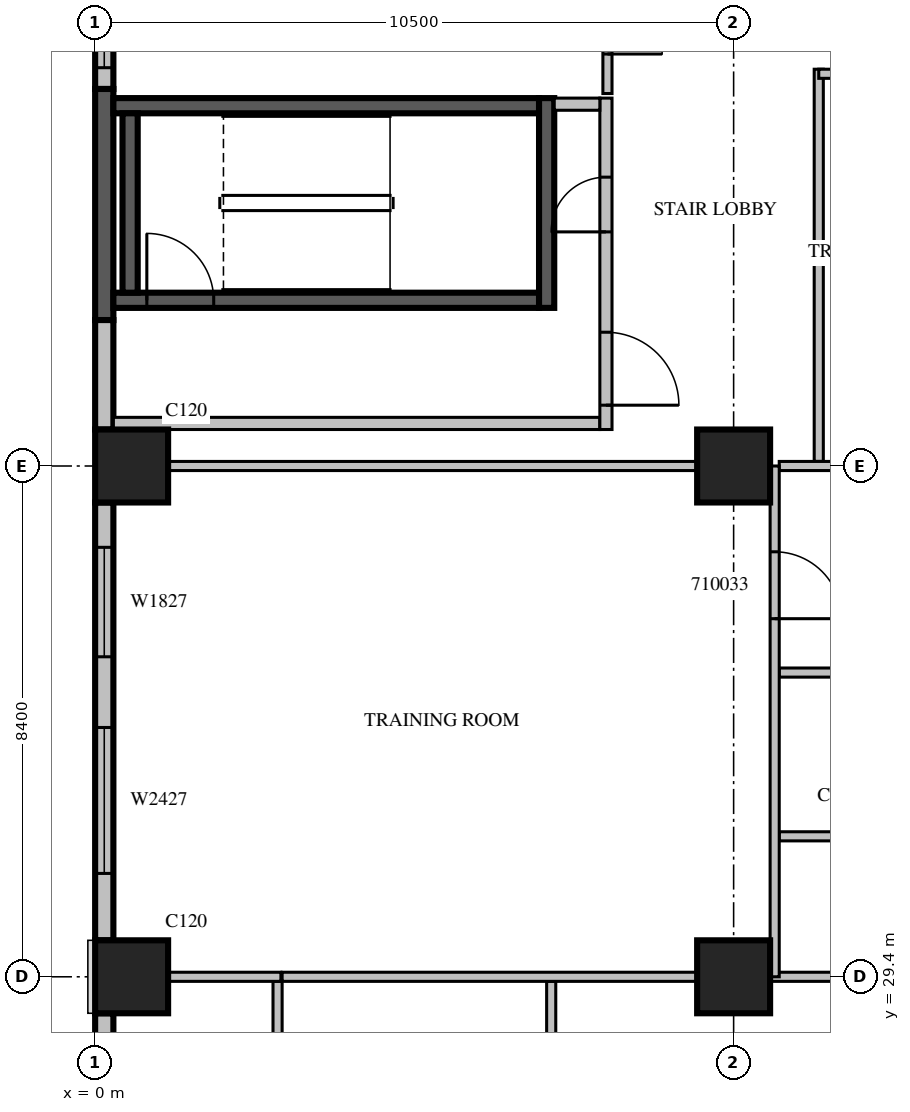
"""IFC4 building model, lengths in metres.
Left out: names, types, materials, properties, quantities, classifications, styles, units other than length and angle.
Written with IfcOpenShell. Run it as: python <this file> out.ifc"""

import sys

from ifc_helpers import new_model, si_unit, direction, frame, frame_2d, origin, origin_2d, place, context, subcontext, project, spatial, rectangle, extrude, source, transform, mapped, element, fill, save


model = new_model("IFC4")
c1 = context("Model", 3, precision=1e-05, world=origin(), true_north=direction((0.0, 1.0)))
c2 = subcontext(c1, "Body", "Model", "MODEL_VIEW")
j1 = project(units=[si_unit("LENGTHUNIT", "METRE"), si_unit("PLANEANGLEUNIT", "RADIAN")], contexts=[c1])
p1 = place(None, origin())
s1 = spatial("IfcSite", under=j1, at=p1, CompositionType="ELEMENT")
p2 = place(p1, origin())
s2 = spatial("IfcBuilding", under=s1, at=p2, CompositionType="ELEMENT")
p3 = place(p2, frame((0.0, 0.0, 53.1)))
s3 = spatial("IfcBuildingStorey", under=s2, at=p3, CompositionType="ELEMENT", Elevation=53.1)
m1 = source(origin(), c2, "Body", "SweptSolid", [
    extrude(rectangle(XDim=1.2, YDim=1.2, at=origin_2d()), origin(), (0.0, 0.0, 1.0), 4.2),
])
for number, where, z_axis, x_axis in (
    (1, (0.6, 29.4, 0.0), (0.0, 0.0, 1.0), (1.0, 0.0, 0.0)),
    (2, (10.5, 29.4, 0.0), (0.0, 0.0, 1.0), (1.0, 0.0, 0.0)),
    (3, (0.6, 37.8, 0.0), (0.0, 0.0, 1.0), (1.0, 0.0, 0.0)),
    (4, (10.5, 37.8, 0.0), (0.0, 0.0, 1.0), (1.0, 0.0, 0.0)),
):
    element("IfcColumn", number, at=place(p3, frame(where, z_axis=z_axis, x_axis=x_axis)), inside=s3, PredefinedType="COLUMN", context=c2, shape_type="MappedRepresentation", body=[
        mapped(m1, transform((0.0, 0.0, 0.0), scale=1.0)),
    ])
m2 = source(origin(), c2, "Body", "SweptSolid", [
    extrude(rectangle(XDim=1.6, YDim=0.3, at=frame_2d((0.8, 0.0))), origin(), (0.0, 0.0, 1.0), 3.8),
])
p4 = place(p3, frame((0.15, 45.6, 0.0), z_axis=(0.0, 0.0, 1.0), x_axis=(0.0, -1.0, 0.0)))
e5 = element("IfcWall", 5, at=p4, inside=s3, PredefinedType="STANDARD", context=c2, shape_type="MappedRepresentation", body=[
    mapped(m2, transform((0.0, 0.0, 0.0), scale=1.0)),
])
m3 = source(origin(), c2, "Body", "SweptSolid", [
    extrude(rectangle(XDim=0.9, YDim=2.7, at=frame_2d((0.45, 1.35))), frame((0.0, 0.16, 0.0), z_axis=(0.0, -1.0, 0.0), x_axis=(1.0, 0.0, 0.0)), (0.0, 0.0, 1.0), 0.32),
])
p5 = place(p4, frame((0.35, 0.0, 0.6)))
e6 = element("IfcOpeningElement", 6, at=p5, cuts=e5, PredefinedType="OPENING", context=c2, shape_type="MappedRepresentation", body=[
    mapped(m3, transform((0.0, 0.0, 0.0), scale=1.0)),
])
m4 = source(origin(), c2, "Body", "SweptSolid", [
    extrude(rectangle(XDim=3.8, YDim=0.3, at=frame_2d((1.9, 0.0))), origin(), (0.0, 0.0, 1.0), 3.8),
])
p6 = place(p3, frame((0.15, 44.0, 0.0), z_axis=(0.0, 0.0, 1.0), x_axis=(0.0, -1.0, 0.0)))
e7 = element("IfcWall", 7, at=p6, inside=s3, PredefinedType="SOLIDWALL", context=c2, shape_type="MappedRepresentation", body=[
    mapped(m4, transform((0.0, 0.0, 0.0), scale=1.0)),
])
m5 = source(origin(), c2, "Body", "SweptSolid", [
    extrude(rectangle(XDim=1.8, YDim=0.3, at=frame_2d((0.9, 0.0))), origin(), (0.0, 0.0, 1.0), 3.8),
])
p7 = place(p3, frame((0.15, 40.2, 0.0), z_axis=(0.0, 0.0, 1.0), x_axis=(0.0, -1.0, 0.0)))
e8 = element("IfcWall", 8, at=p7, inside=s3, PredefinedType="STANDARD", context=c2, shape_type="MappedRepresentation", body=[
    mapped(m5, transform((0.0, 0.0, 0.0), scale=1.0)),
])
m6 = source(origin(), c2, "Body", "SweptSolid", [
    extrude(rectangle(XDim=7.2, YDim=0.3, at=frame_2d((3.6, 0.0))), origin(), (0.0, 0.0, 1.0), 3.8),
])
p8 = place(p3, frame((0.15, 37.2, 0.0), z_axis=(0.0, 0.0, 1.0), x_axis=(0.0, -1.0, 0.0)))
e9 = element("IfcWall", 9, at=p8, inside=s3, PredefinedType="STANDARD", context=c2, shape_type="MappedRepresentation", body=[
    mapped(m6, transform((0.0, 0.0, 0.0), scale=1.0)),
])
m7 = source(origin(), c2, "Body", "SweptSolid", [
    extrude(rectangle(XDim=1.8, YDim=2.7, at=frame_2d((0.9, 1.35))), frame((0.0, 0.16, 0.0), z_axis=(0.0, -1.0, 0.0), x_axis=(1.0, 0.0, 0.0)), (0.0, 0.0, 1.0), 0.32),
])
p9 = place(p8, frame((0.738, 0.0, 0.6)))
e10 = element("IfcOpeningElement", 10, at=p9, cuts=e9, PredefinedType="OPENING", context=c2, shape_type="MappedRepresentation", body=[
    mapped(m7, transform((0.0, 0.0, 0.0), scale=1.0)),
])
m8 = source(origin(), c2, "Body", "SweptSolid", [
    extrude(rectangle(XDim=2.4, YDim=2.7, at=frame_2d((1.2, 1.35))), frame((0.0, 0.16, 0.0), z_axis=(0.0, -1.0, 0.0), x_axis=(1.0, 0.0, 0.0)), (0.0, 0.0, 1.0), 0.32),
])
p10 = place(p8, frame((3.7, 0.0, 0.6)))
e11 = element("IfcOpeningElement", 11, at=p10, cuts=e9, PredefinedType="OPENING", context=c2, shape_type="MappedRepresentation", body=[
    mapped(m8, transform((0.0, 0.0, 0.0), scale=1.0)),
])
m9 = source(origin(), c2, "Body", "SweptSolid", [
    extrude(rectangle(XDim=7.2, YDim=0.3, at=frame_2d((3.6, 0.0))), origin(), (0.0, 0.0, 1.0), 3.3),
])
p11 = place(p3, frame((0.15, 28.8, 0.0), z_axis=(0.0, 0.0, 1.0), x_axis=(0.0, -1.0, 0.0)))
e12 = element("IfcWall", 12, at=p11, inside=s3, PredefinedType="STANDARD", context=c2, shape_type="MappedRepresentation", body=[
    mapped(m9, transform((0.0, 0.0, 0.0), scale=1.0)),
])
m10 = source(origin(), c2, "Body", "SweptSolid", [
    extrude(rectangle(XDim=3.0, YDim=2.7, at=frame_2d((1.5, 1.35))), frame((0.0, 0.16, 0.0), z_axis=(0.0, -1.0, 0.0), x_axis=(1.0, 0.0, 0.0)), (0.0, 0.0, 1.0), 0.32),
])
p12 = place(p11, frame((1.68, 0.0, 0.6)))
e13 = element("IfcOpeningElement", 13, at=p12, cuts=e12, PredefinedType="OPENING", context=c2, shape_type="MappedRepresentation", body=[
    mapped(m10, transform((0.0, 0.0, 0.0), scale=1.0)),
])
m11 = source(origin(), c2, "Body", "SweptSolid", [
    extrude(rectangle(XDim=7.0, YDim=0.25, at=frame_2d((3.5, 0.0))), origin(), (0.0, 0.0, 1.0), 3.8),
])
p13 = place(p3, frame((0.3, 40.525, 0.0), z_axis=(0.0, 0.0, 1.0), x_axis=(1.0, 0.0, 0.0)))
e14 = element("IfcWall", 14, at=p13, inside=s3, PredefinedType="SOLIDWALL", context=c2, shape_type="MappedRepresentation", body=[
    mapped(m11, transform((0.0, 0.0, 0.0), scale=1.0)),
])
m12 = source(origin(), c2, "Body", "SweptSolid", [
    extrude(rectangle(XDim=1.1, YDim=2.1, at=frame_2d((0.55, 1.05))), frame((0.0, 0.135, 0.0), z_axis=(0.0, -1.0, 0.0), x_axis=(1.0, 0.0, 0.0)), (0.0, 0.0, 1.0), 0.27),
])
p14 = place(p13, frame((0.55, 0.0, 0.0)))
e15 = element("IfcOpeningElement", 15, at=p14, cuts=e14, PredefinedType="OPENING", context=c2, shape_type="MappedRepresentation", body=[
    mapped(m12, transform((0.0, 0.0, 0.0), scale=1.0)),
])
p15 = place(p3, frame((0.3, 43.725, 0.0), z_axis=(0.0, 0.0, 1.0), x_axis=(1.0, 0.0, 0.0)))
e16 = element("IfcWall", 16, at=p15, inside=s3, PredefinedType="SOLIDWALL", context=c2, shape_type="MappedRepresentation", body=[
    mapped(m11, transform((0.0, 0.0, 0.0), scale=1.0)),
])
m13 = source(origin(), c2, "Body", "SweptSolid", [
    extrude(rectangle(XDim=3.45, YDim=0.25, at=frame_2d((1.725, 0.0))), origin(), (0.0, 0.0, 1.0), 3.8),
])
p16 = place(p3, frame((7.425, 40.4, 0.0), z_axis=(0.0, 0.0, 1.0), x_axis=(0.0, 1.0, 0.0)))
e17 = element("IfcWall", 17, at=p16, inside=s3, PredefinedType="SOLIDWALL", context=c2, shape_type="MappedRepresentation", body=[
    mapped(m13, transform((0.0, 0.0, 0.0), scale=1.0)),
])
m14 = source(origin(), c2, "Body", "SweptSolid", [
    extrude(rectangle(XDim=2.95, YDim=0.25, at=frame_2d((1.475, 0.0))), origin(), (0.0, 0.0, 1.0), 3.8),
])
p17 = place(p3, frame((0.575, 40.65, 0.0), z_axis=(0.0, 0.0, 1.0), x_axis=(0.0, 1.0, 0.0)))
e18 = element("IfcWall", 18, at=p17, inside=s3, PredefinedType="SOLIDWALL", context=c2, shape_type="MappedRepresentation", body=[
    mapped(m14, transform((0.0, 0.0, 0.0), scale=1.0)),
])
m15 = source(origin(), c2, "Body", "SweptSolid", [
    extrude(rectangle(XDim=8.0, YDim=0.2, at=frame_2d((4.0, 0.0))), origin(), (0.0, 0.0, 1.0), 3.8),
])
p18 = place(p3, frame((0.3, 38.5, 0.0), z_axis=(0.0, 0.0, 1.0), x_axis=(1.0, 0.0, 0.0)))
e19 = element("IfcWall", 19, at=p18, inside=s3, PredefinedType="PARTITIONING", context=c2, shape_type="MappedRepresentation", body=[
    mapped(m15, transform((0.0, 0.0, 0.0), scale=1.0)),
])
m16 = source(origin(), c2, "Body", "SweptSolid", [
    extrude(rectangle(XDim=5.45, YDim=0.2, at=frame_2d((2.725, 0.0))), origin(), (0.0, 0.0, 1.0), 3.8),
])
p19 = place(p3, frame((8.4, 38.4, 0.0), z_axis=(0.0, 0.0, 1.0), x_axis=(0.0, 1.0, 0.0)))
e20 = element("IfcWall", 20, at=p19, inside=s3, PredefinedType="PARTITIONING", context=c2, shape_type="MappedRepresentation", body=[
    mapped(m16, transform((0.0, 0.0, 0.0), scale=1.0)),
])
m17 = source(origin(), c2, "Body", "SweptSolid", [
    extrude(rectangle(XDim=1.2, YDim=2.1, at=frame_2d((0.6, 1.05))), frame((0.0, 0.11, 0.0), z_axis=(0.0, -1.0, 0.0), x_axis=(1.0, 0.0, 0.0)), (0.0, 0.0, 1.0), 0.22),
])
p20 = place(p19, frame((0.4, 0.0, 0.0)))
e21 = element("IfcOpeningElement", 21, at=p20, cuts=e20, PredefinedType="OPENING", context=c2, shape_type="MappedRepresentation", body=[
    mapped(m17, transform((0.0, 0.0, 0.0), scale=1.0)),
])
m18 = source(origin(), c2, "Body", "SweptSolid", [
    extrude(rectangle(XDim=0.9, YDim=2.1, at=frame_2d((0.45, 1.05))), frame((0.0, 0.11, 0.0), z_axis=(0.0, -1.0, 0.0), x_axis=(1.0, 0.0, 0.0)), (0.0, 0.0, 1.0), 0.22),
])
p21 = place(p19, frame((3.25, 0.0, 0.0)))
e22 = element("IfcOpeningElement", 22, at=p21, cuts=e20, PredefinedType="OPENING", context=c2, shape_type="MappedRepresentation", body=[
    mapped(m18, transform((0.0, 0.0, 0.0), scale=1.0)),
])
m19 = source(origin(), c2, "Body", "SweptSolid", [
    extrude(rectangle(XDim=0.75, YDim=0.2, at=frame_2d((0.375, 0.0))), origin(), (0.0, 0.0, 1.0), 3.8),
])
p22 = place(p3, frame((7.55, 43.75, 0.0), z_axis=(0.0, 0.0, 1.0), x_axis=(1.0, 0.0, 0.0)))
e23 = element("IfcWall", 23, at=p22, inside=s3, PredefinedType="PARTITIONING", context=c2, shape_type="MappedRepresentation", body=[
    mapped(m19, transform((0.0, 0.0, 0.0), scale=1.0)),
])
m20 = source(origin(), c2, "Body", "SweptSolid", [
    extrude(rectangle(XDim=5.15, YDim=0.15, at=frame_2d((2.575, 0.0))), origin(), (0.0, 0.0, 1.0), 3.3),
])
p23 = place(p3, frame((7.5, 24.175, 0.0), z_axis=(0.0, 0.0, 1.0), x_axis=(0.0, 1.0, 0.0)))
e24 = element("IfcWall", 24, at=p23, inside=s3, PredefinedType="PARTITIONING", context=c2, shape_type="MappedRepresentation", body=[
    mapped(m20, transform((0.0, 0.0, 0.0), scale=1.0)),
])
m21 = source(origin(), c2, "Body", "SweptSolid", [
    extrude(rectangle(XDim=6.826, YDim=0.15, at=frame_2d((3.413, 0.0))), origin(), (0.0, 0.0, 1.0), 3.8),
])
p24 = place(p3, frame((9.901, 29.4, 0.0), z_axis=(0.0, 0.0, 1.0), x_axis=(-1.0, 0.0, 0.0)))
e25 = element("IfcWall", 25, at=p24, inside=s3, PredefinedType="PARTITIONING", context=c2, shape_type="MappedRepresentation", body=[
    mapped(m21, transform((0.0, 0.0, 0.0), scale=1.0)),
])
m22 = source(origin(), c2, "Body", "SweptSolid", [
    extrude(rectangle(XDim=3.901, YDim=0.15, at=frame_2d((1.95, 0.0))), origin(), (0.0, 0.0, 1.0), 3.8),
])
p25 = place(p3, frame((15.0, 29.4, 0.0), z_axis=(0.0, 0.0, 1.0), x_axis=(-1.0, 0.0, 0.0)))
e26 = element("IfcWall", 26, at=p25, inside=s3, PredefinedType="PARTITIONING", context=c2, shape_type="MappedRepresentation", body=[
    mapped(m22, transform((0.0, 0.0, 0.0), scale=1.0)),
])
m23 = source(origin(), c2, "Body", "SweptSolid", [
    extrude(rectangle(XDim=7.125, YDim=0.15, at=frame_2d((3.562, 0.0))), origin(), (0.0, 0.0, 1.0), 3.3),
])
p26 = place(p3, frame((3.0, 29.325, 0.0), z_axis=(0.0, 0.0, 1.0), x_axis=(0.0, -1.0, 0.0)))
e27 = element("IfcWall", 27, at=p26, inside=s3, PredefinedType="PARTITIONING", context=c2, shape_type="MappedRepresentation", body=[
    mapped(m23, transform((0.0, 0.0, 0.0), scale=1.0)),
])
m24 = source(origin(), c2, "Body", "SweptSolid", [
    extrude(rectangle(XDim=1.0, YDim=2.1, at=frame_2d((0.5, 1.05))), frame((0.0, 0.085, 0.0), z_axis=(0.0, -1.0, 0.0), x_axis=(1.0, 0.0, 0.0)), (0.0, 0.0, 1.0), 0.17),
])
p27 = place(p26, frame((5.675, 0.0, 0.0)))
e28 = element("IfcOpeningElement", 28, at=p27, cuts=e27, PredefinedType="OPENING", context=c2, shape_type="MappedRepresentation", body=[
    mapped(m24, transform((0.0, 0.0, 0.0), scale=1.0)),
])
m25 = source(origin(), c2, "Body", "SweptSolid", [
    extrude(rectangle(XDim=6.45, YDim=0.15, at=frame_2d((3.225, 0.0))), origin(), (0.0, 0.0, 1.0), 3.8),
])
p28 = place(p3, frame((11.9, 44.325, 0.0), z_axis=(0.0, 0.0, 1.0), x_axis=(0.0, -1.0, 0.0)))
e29 = element("IfcWall", 29, at=p28, inside=s3, PredefinedType="PARTITIONING", context=c2, shape_type="MappedRepresentation", body=[
    mapped(m25, transform((0.0, 0.0, 0.0), scale=1.0)),
])
m26 = source(origin(), c2, "Body", "SweptSolid", [
    extrude(rectangle(XDim=3.175, YDim=0.15, at=frame_2d((1.587, 0.0))), origin(), (0.0, 0.0, 1.0), 3.8),
])
p29 = place(p3, frame((15.075, 44.25, 0.0), z_axis=(0.0, 0.0, 1.0), x_axis=(-1.0, 0.0, 0.0)))
e30 = element("IfcWall", 30, at=p29, inside=s3, PredefinedType="PARTITIONING", context=c2, shape_type="MappedRepresentation", body=[
    mapped(m26, transform((0.0, 0.0, 0.0), scale=1.0)),
])
m27 = source(origin(), c2, "Body", "SweptSolid", [
    extrude(rectangle(XDim=2.2, YDim=0.15, at=frame_2d((1.1, 0.0))), origin(), (0.0, 0.0, 1.0), 3.8),
])
p30 = place(p3, frame((8.425, 43.925, 0.0), z_axis=(0.0, 0.0, 1.0), x_axis=(0.0, 1.0, 0.0)))
e31 = element("IfcWall", 31, at=p30, inside=s3, PredefinedType="PARTITIONING", context=c2, shape_type="MappedRepresentation", body=[
    mapped(m27, transform((0.0, 0.0, 0.0), scale=1.0)),
])
m28 = source(origin(), c2, "Body", "SweptSolid", [
    extrude(rectangle(XDim=0.9, YDim=2.1, at=frame_2d((0.45, 1.05))), frame((0.0, 0.085, 0.0), z_axis=(0.0, -1.0, 0.0), x_axis=(1.0, 0.0, 0.0)), (0.0, 0.0, 1.0), 0.17),
])
p31 = place(p30, frame((0.65, 0.0, 0.0)))
e32 = element("IfcOpeningElement", 32, at=p31, cuts=e31, PredefinedType="OPENING", context=c2, shape_type="MappedRepresentation", body=[
    mapped(m28, transform((0.0, 0.0, 0.0), scale=1.0)),
])
m29 = source(origin(), c2, "Body", "SweptSolid", [
    extrude(rectangle(XDim=3.75, YDim=0.15, at=frame_2d((1.875, 0.0))), origin(), (0.0, 0.0, 1.0), 3.8),
])
for number, where, z_axis, x_axis in (
    (33, (15.0, 31.71, 0.0), (0.0, 0.0, 1.0), (-1.0, 0.0, 0.0)),
    (34, (15.0, 34.403, 0.0), (0.0, 0.0, 1.0), (-1.0, 0.0, 0.0)),
):
    element("IfcWall", number, at=place(p3, frame(where, z_axis=z_axis, x_axis=x_axis)), inside=s3, PredefinedType="PARTITIONING", context=c2, shape_type="MappedRepresentation", body=[
        mapped(m29, transform((0.0, 0.0, 0.0), scale=1.0)),
    ])
m30 = source(origin(), c2, "Body", "SweptSolid", [
    extrude(rectangle(XDim=1.856, YDim=0.15, at=frame_2d((0.928, 0.0))), origin(), (0.0, 0.0, 1.0), 3.8),
])
p32 = place(p3, frame((3.055, 29.4, 0.0), z_axis=(0.0, 0.0, 1.0), x_axis=(-1.0, 0.0, 0.0)))
e35 = element("IfcWall", 35, at=p32, inside=s3, PredefinedType="PARTITIONING", context=c2, shape_type="MappedRepresentation", body=[
    mapped(m30, transform((0.0, 0.0, 0.0), scale=1.0)),
])
m31 = source(origin(), c2, "Body", "SweptSolid", [
    extrude(rectangle(XDim=8.702, YDim=0.15, at=frame_2d((4.351, 0.0))), origin(), (0.0, 0.0, 1.0), 3.8),
])
p33 = place(p3, frame((9.901, 37.8, 0.0), z_axis=(0.0, 0.0, 1.0), x_axis=(-1.0, 0.0, 0.0)))
e36 = element("IfcWall", 36, at=p33, inside=s3, PredefinedType="PARTITIONING", context=c2, shape_type="MappedRepresentation", body=[
    mapped(m31, transform((0.0, 0.0, 0.0), scale=1.0)),
])
p34 = place(p3, frame((15.0, 37.8, 0.0), z_axis=(0.0, 0.0, 1.0), x_axis=(-1.0, 0.0, 0.0)))
e37 = element("IfcWall", 37, at=p34, inside=s3, PredefinedType="PARTITIONING", context=c2, shape_type="MappedRepresentation", body=[
    mapped(m29, transform((0.0, 0.0, 0.0), scale=1.0)),
])
m32 = source(origin(), c2, "Body", "SweptSolid", [
    extrude(rectangle(XDim=8.4, YDim=0.15, at=frame_2d((4.2, 0.0))), origin(), (0.0, 0.0, 1.0), 3.8),
])
p35 = place(p3, frame((11.175, 29.4, 0.0), z_axis=(0.0, 0.0, 1.0), x_axis=(0.0, 1.0, 0.0)))
e38 = element("IfcWall", 38, at=p35, inside=s3, PredefinedType="PARTITIONING", context=c2, shape_type="MappedRepresentation", body=[
    mapped(m32, transform((0.0, 0.0, 0.0), scale=1.0)),
])
m33 = source(origin(), c2, "Body", "SweptSolid", [
    extrude(rectangle(XDim=1.1, YDim=2.1, at=frame_2d((0.55, 1.05))), frame((0.0, 0.085, 0.0), z_axis=(0.0, -1.0, 0.0), x_axis=(1.0, 0.0, 0.0)), (0.0, 0.0, 1.0), 0.17),
])
p36 = place(p35, frame((5.889, 0.0, 0.0)))
e39 = element("IfcOpeningElement", 39, at=p36, cuts=e38, PredefinedType="OPENING", context=c2, shape_type="MappedRepresentation", body=[
    mapped(m33, transform((0.0, 0.0, 0.0), scale=1.0)),
])
m34 = source(origin(), c2, "Body", "SweptSolid", [
    extrude(rectangle(XDim=0.9, YDim=2.7, at=frame_2d((0.45, 1.35))), frame((0.0, 0.03, 0.0), z_axis=(0.0, -1.0, 0.0), x_axis=(1.0, 0.0, 0.0)), (0.0, 0.0, 1.0), 0.06),
])
p37 = place(p5, origin())
e40 = element("IfcWindow", 40, at=p37, inside=s3, PartitioningType="SINGLE_PANEL", PredefinedType="WINDOW", context=c2, shape_type="MappedRepresentation", body=[
    mapped(m34, transform((0.0, 0.0, 0.0), scale=1.0)),
])
fill(e6, e40)
m35 = source(origin(), c2, "Body", "SweptSolid", [
    extrude(rectangle(XDim=1.8, YDim=2.7, at=frame_2d((0.9, 1.35))), frame((0.0, 0.03, 0.0), z_axis=(0.0, -1.0, 0.0), x_axis=(1.0, 0.0, 0.0)), (0.0, 0.0, 1.0), 0.06),
])
p38 = place(p9, origin())
e41 = element("IfcWindow", 41, at=p38, inside=s3, PartitioningType="SINGLE_PANEL", PredefinedType="WINDOW", context=c2, shape_type="MappedRepresentation", body=[
    mapped(m35, transform((0.0, 0.0, 0.0), scale=1.0)),
])
fill(e10, e41)
m36 = source(origin(), c2, "Body", "SweptSolid", [
    extrude(rectangle(XDim=2.4, YDim=2.7, at=frame_2d((1.2, 1.35))), frame((0.0, 0.03, 0.0), z_axis=(0.0, -1.0, 0.0), x_axis=(1.0, 0.0, 0.0)), (0.0, 0.0, 1.0), 0.06),
])
p39 = place(p10, origin())
e42 = element("IfcWindow", 42, at=p39, inside=s3, PartitioningType="SINGLE_PANEL", PredefinedType="WINDOW", context=c2, shape_type="MappedRepresentation", body=[
    mapped(m36, transform((0.0, 0.0, 0.0), scale=1.0)),
])
fill(e11, e42)
m37 = source(origin(), c2, "Body", "SweptSolid", [
    extrude(rectangle(XDim=1.1, YDim=2.1, at=frame_2d((0.55, 1.05))), frame((0.0, 0.025, 0.0), z_axis=(0.0, -1.0, 0.0), x_axis=(1.0, 0.0, 0.0)), (0.0, 0.0, 1.0), 0.05),
])
p40 = place(p14, origin())
e43 = element("IfcDoor", 43, at=p40, inside=s3, OperationType="SINGLE_SWING_LEFT", PredefinedType="DOOR", context=c2, shape_type="MappedRepresentation", body=[
    mapped(m37, transform((0.0, 0.0, 0.0), scale=1.0)),
])
fill(e15, e43)
m38 = source(origin(), c2, "Body", "SweptSolid", [
    extrude(rectangle(XDim=1.2, YDim=2.1, at=frame_2d((0.6, 1.05))), frame((0.0, 0.025, 0.0), z_axis=(0.0, -1.0, 0.0), x_axis=(1.0, 0.0, 0.0)), (0.0, 0.0, 1.0), 0.05),
])
p41 = place(p20, origin())
e44 = element("IfcDoor", 44, at=p41, inside=s3, OperationType="SINGLE_SWING_RIGHT", PredefinedType="DOOR", context=c2, shape_type="MappedRepresentation", body=[
    mapped(m38, transform((0.0, 0.0, 0.0), scale=1.0)),
])
fill(e21, e44)
m39 = source(origin(), c2, "Body", "SweptSolid", [
    extrude(rectangle(XDim=0.9, YDim=2.1, at=frame_2d((0.45, 1.05))), frame((0.0, 0.025, 0.0), z_axis=(0.0, -1.0, 0.0), x_axis=(1.0, 0.0, 0.0)), (0.0, 0.0, 1.0), 0.05),
])
p42 = place(p21, origin())
e45 = element("IfcDoor", 45, at=p42, inside=s3, OperationType="SINGLE_SWING_LEFT", PredefinedType="DOOR", context=c2, shape_type="MappedRepresentation", body=[
    mapped(m39, transform((0.0, 0.0, 0.0), scale=1.0)),
])
fill(e22, e45)
p43 = place(p31, origin())
e46 = element("IfcDoor", 46, at=p43, inside=s3, OperationType="SINGLE_SWING_RIGHT", PredefinedType="DOOR", context=c2, shape_type="MappedRepresentation", body=[
    mapped(m39, transform((0.0, 0.0, 0.0), scale=1.0)),
])
fill(e32, e46)
p44 = place(p36, origin())
e47 = element("IfcDoor", 47, at=p44, inside=s3, OperationType="SINGLE_SWING_RIGHT", PredefinedType="DOOR", context=c2, shape_type="MappedRepresentation", body=[
    mapped(m37, transform((0.0, 0.0, 0.0), scale=1.0)),
])
fill(e39, e47)
save(model, sys.argv[1])
